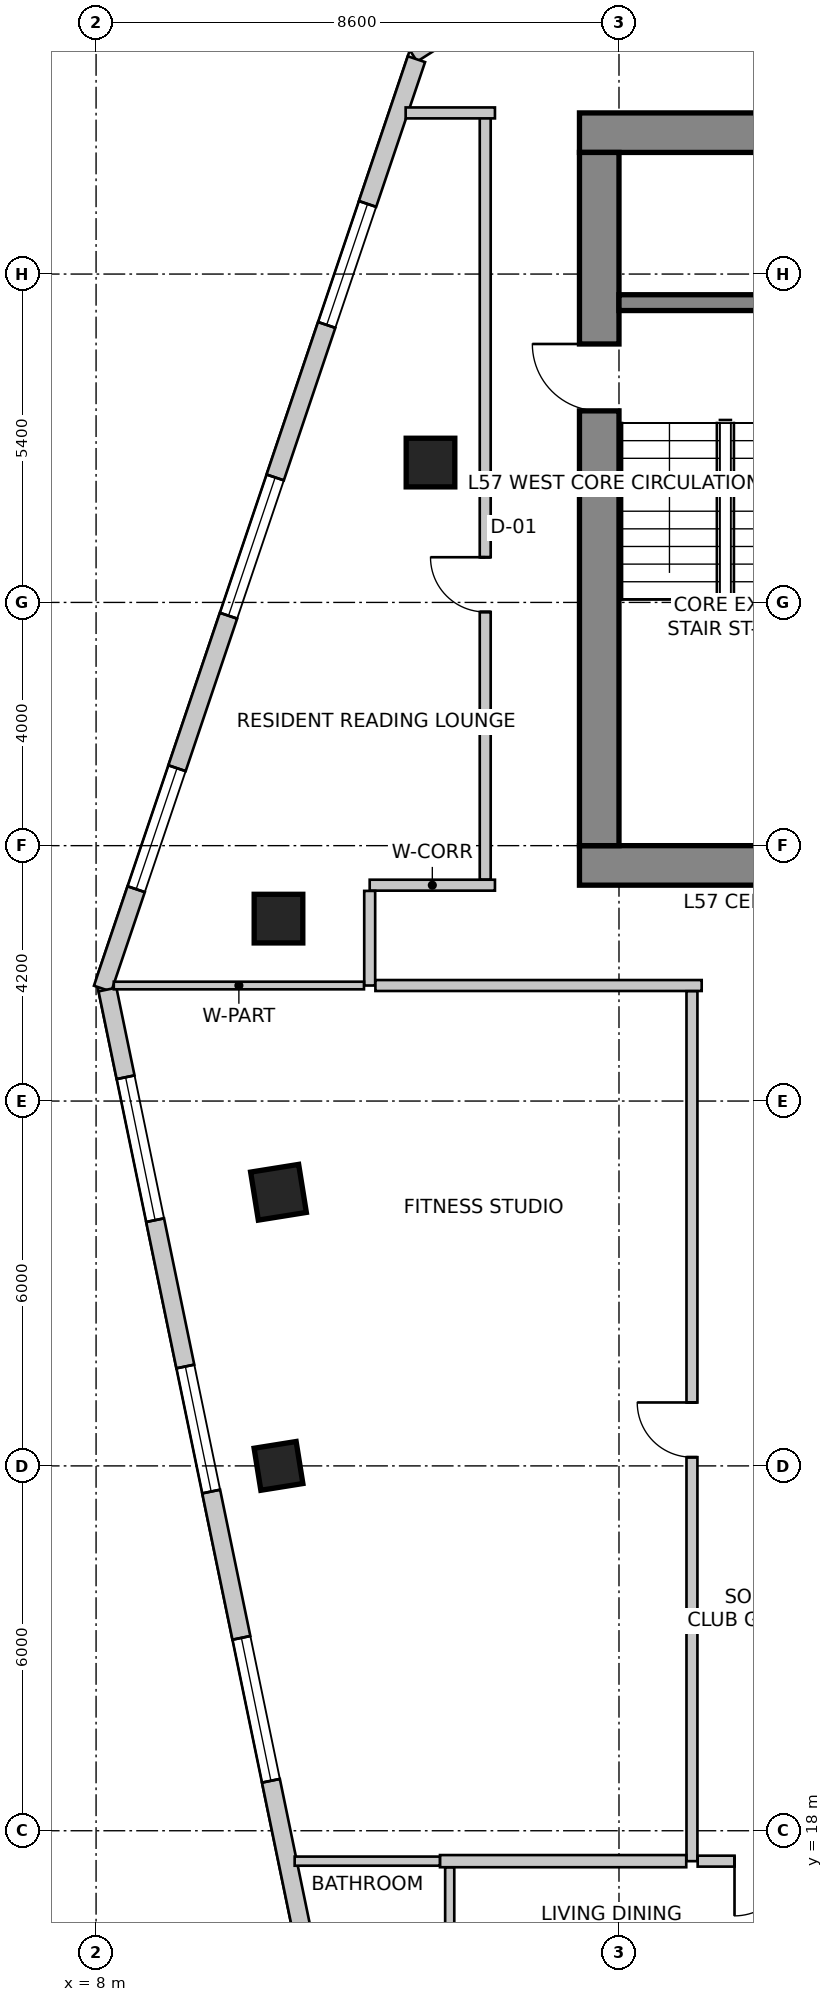
"""IFC4 building model, lengths in metres.
Left out: names, types, materials, properties, quantities, classifications, styles, units other than length and angle.
Written with IfcOpenShell. Run it as: python <this file> out.ifc"""

import sys

from ifc_helpers import new_model, si_unit, direction, frame, frame_2d, origin, origin_2d, place, context, subcontext, project, spatial, rectangle, extrude, source, transform, mapped, element, fill, save


model = new_model("IFC4")
c1 = context("Model", 3, precision=1e-05, world=origin(), true_north=direction((0.0, 1.0)))
c2 = subcontext(c1, "Body", "Model", "MODEL_VIEW")
j1 = project(units=[si_unit("LENGTHUNIT", "METRE"), si_unit("PLANEANGLEUNIT", "RADIAN")], contexts=[c1])
p1 = place(None, origin())
s1 = spatial("IfcSite", under=j1, at=p1, CompositionType="ELEMENT")
p2 = place(p1, origin())
s2 = spatial("IfcBuilding", under=s1, at=p2, CompositionType="ELEMENT")
p3 = place(p2, frame((0.0, 0.0, 225.4)))
s3 = spatial("IfcBuildingStorey", under=s2, at=p3, CompositionType="ELEMENT", Elevation=225.4)
p4 = place(p3, frame((15.95, 45.925, 0.0), z_axis=(0.0, 0.0, 1.0), x_axis=(1.0, 0.0, 0.0)))
e1 = element("IfcWall", 1, at=p4, inside=s3, PredefinedType="SHEAR", context=c2, shape_type="SweptSolid", body=[
    extrude(rectangle(XDim=15.7, YDim=0.65, at=frame_2d((7.85, 0.0))), origin(), (0.0, 0.0, 1.0), 3.5),
])
p5 = place(p3, frame((15.95, 33.875, 0.0), z_axis=(0.0, 0.0, 1.0), x_axis=(1.0, 0.0, 0.0)))
e2 = element("IfcWall", 2, at=p5, inside=s3, PredefinedType="SHEAR", context=c2, shape_type="SweptSolid", body=[
    extrude(rectangle(XDim=15.7, YDim=0.65, at=frame_2d((7.85, 0.0))), origin(), (0.0, 0.0, 1.0), 3.5),
])
m1 = source(origin(), c2, "Body", "SweptSolid", [
    extrude(rectangle(XDim=1.1, YDim=2.15, at=frame_2d((0.55, 1.075))), frame((0.0, 0.335, 0.0), z_axis=(0.0, -1.0, 0.0), x_axis=(1.0, 0.0, 0.0)), (0.0, 0.0, 1.0), 0.67),
])
p6 = place(p5, frame((10.08, 0.0, 0.0)))
e3 = element("IfcOpeningElement", 3, at=p6, cuts=e2, PredefinedType="OPENING", context=c2, shape_type="MappedRepresentation", body=[
    mapped(m1, transform((0.0, 0.0, 0.0), scale=1.0)),
])
p7 = place(p3, frame((16.275, 34.2, 0.0), z_axis=(0.0, 0.0, 1.0), x_axis=(0.0, 1.0, 0.0)))
e4 = element("IfcWall", 4, at=p7, inside=s3, PredefinedType="SHEAR", context=c2, shape_type="SweptSolid", body=[
    extrude(rectangle(XDim=11.4, YDim=0.65, at=frame_2d((5.7, 0.0))), origin(), (0.0, 0.0, 1.0), 3.5),
])
p8 = place(p7, frame((7.15, 0.0, 0.0)))
e5 = element("IfcOpeningElement", 5, at=p8, cuts=e4, PredefinedType="OPENING", context=c2, shape_type="MappedRepresentation", body=[
    mapped(m1, transform((0.0, 0.0, 0.0), scale=1.0)),
])
p9 = place(p3, frame((16.6, 43.13, 0.0), z_axis=(0.0, 0.0, 1.0), x_axis=(1.0, 0.0, 0.0)))
e6 = element("IfcWall", 6, at=p9, inside=s3, PredefinedType="SHEAR", context=c2, shape_type="SweptSolid", body=[
    extrude(rectangle(XDim=3.5, YDim=0.26, at=frame_2d((1.75, 0.0))), origin(), (0.0, 0.0, 1.0), 3.5),
])
m2 = source(origin(), c2, "Body", "SweptSolid", [
    extrude(rectangle(XDim=0.8, YDim=0.8, at=origin_2d()), origin(), (0.0, 0.0, 1.0), 3.5),
])
for number, where, z_axis, x_axis in (
    (7, (11.0, 33.0, 0.0), (0.0, 0.0, 1.0), (1.0, 0.0, 0.0)),
    (8, (13.5, 40.5, 0.0), (0.0, 0.0, 1.0), (1.0, 0.0, 0.0)),
    (9, (11.0, 28.5, 0.0), (0.0, 0.0, 1.0), (0.158, -0.987, 0.0)),
):
    element("IfcColumn", number, at=place(p3, frame(where, z_axis=z_axis, x_axis=x_axis)), inside=s3, PredefinedType="COLUMN", context=c2, shape_type="MappedRepresentation", body=[
        mapped(m2, transform((0.0, 0.0, 0.0), scale=1.0)),
    ])
m3 = source(origin(), c2, "Body", "SweptSolid", [
    extrude(rectangle(XDim=0.7, YDim=0.7, at=origin_2d()), origin(), (0.0, 0.0, 1.0), 3.5),
])
p10 = place(p3, frame((11.0, 24.0, 0.0), z_axis=(0.0, 0.0, 1.0), x_axis=(0.158158067254, -0.987413806751, 0.0)))
e10 = element("IfcColumn", 10, at=p10, inside=s3, PredefinedType="COLUMN", context=c2, shape_type="MappedRepresentation", body=[
    mapped(m3, transform((0.0, 0.0, 0.0), scale=1.0)),
])
p11 = place(p3, frame((21.874, 52.742, 0.0), z_axis=(0.0, 0.0, 1.0), x_axis=(-0.84365659959, -0.536883173482, 0.0)))
e11 = element("IfcWall", 11, at=p11, inside=s3, PredefinedType="SOLIDWALL", context=c2, shape_type="SweptSolid", body=[
    extrude(rectangle(XDim=10.283, YDim=0.3, at=frame_2d((5.142, 0.0))), origin(), (0.0, 0.0, 1.0), 3.25),
])
m4 = source(origin(), c2, "Body", "SweptSolid", [
    extrude(rectangle(XDim=2.4, YDim=2.2, at=frame_2d((1.2, 1.1))), frame((0.0, 0.16, 0.0), z_axis=(0.0, -1.0, 0.0), x_axis=(1.0, 0.0, 0.0)), (0.0, 0.0, 1.0), 0.32),
])
p12 = place(p11, frame((3.307, 0.0, 0.85)))
e12 = element("IfcOpeningElement", 12, at=p12, cuts=e11, PredefinedType="OPENING", context=c2, shape_type="MappedRepresentation", body=[
    mapped(m4, transform((0.0, 0.0, 0.0), scale=1.0)),
])
p13 = place(p3, frame((13.269, 47.134, 0.0), z_axis=(0.0, 0.0, 1.0), x_axis=(-0.319920776449, -0.947444297464, 0.0)))
e13 = element("IfcWall", 13, at=p13, inside=s3, PredefinedType="SOLIDWALL", context=c2, shape_type="SweptSolid", body=[
    extrude(rectangle(XDim=16.133, YDim=0.3, at=frame_2d((8.067, 0.0))), origin(), (0.0, 0.0, 1.0), 3.25),
])
m5 = source(origin(), c2, "Body", "SweptSolid", [
    extrude(rectangle(XDim=2.1, YDim=2.0, at=frame_2d((1.05, 1.0))), frame((0.0, 0.16, 0.0), z_axis=(0.0, -1.0, 0.0), x_axis=(1.0, 0.0, 0.0)), (0.0, 0.0, 1.0), 0.32),
])
p14 = place(p13, frame((2.513, 0.0, 0.85)))
e14 = element("IfcOpeningElement", 14, at=p14, cuts=e13, PredefinedType="OPENING", context=c2, shape_type="MappedRepresentation", body=[
    mapped(m5, transform((0.0, 0.0, 0.0), scale=1.0)),
])
p15 = place(p13, frame((7.26, 0.0, 0.85)))
e15 = element("IfcOpeningElement", 15, at=p15, cuts=e13, PredefinedType="OPENING", context=c2, shape_type="MappedRepresentation", body=[
    mapped(m4, transform((0.0, 0.0, 0.0), scale=1.0)),
])
p16 = place(p13, frame((12.307, 0.0, 0.85)))
e16 = element("IfcOpeningElement", 16, at=p16, cuts=e13, PredefinedType="OPENING", context=c2, shape_type="MappedRepresentation", body=[
    mapped(m5, transform((0.0, 0.0, 0.0), scale=1.0)),
])
p17 = place(p3, frame((8.188, 31.834, 0.0), z_axis=(0.0, 0.0, 1.0), x_axis=(0.202303475707, -0.979322880217, 0.0)))
e17 = element("IfcWall", 17, at=p17, inside=s3, PredefinedType="SOLIDWALL", context=c2, shape_type="SweptSolid", body=[
    extrude(rectangle(XDim=15.766, YDim=0.3, at=frame_2d((7.883, 0.0))), origin(), (0.0, 0.0, 1.0), 3.25),
])
p18 = place(p17, frame((1.473, 0.0, 0.85)))
e18 = element("IfcOpeningElement", 18, at=p18, cuts=e17, PredefinedType="OPENING", context=c2, shape_type="MappedRepresentation", body=[
    mapped(m4, transform((0.0, 0.0, 0.0), scale=1.0)),
])
p19 = place(p17, frame((6.33, 0.0, 0.85)))
e19 = element("IfcOpeningElement", 19, at=p19, cuts=e17, PredefinedType="OPENING", context=c2, shape_type="MappedRepresentation", body=[
    mapped(m5, transform((0.0, 0.0, 0.0), scale=1.0)),
])
p20 = place(p17, frame((10.887, 0.0, 0.85)))
e20 = element("IfcOpeningElement", 20, at=p20, cuts=e17, PredefinedType="OPENING", context=c2, shape_type="MappedRepresentation", body=[
    mapped(m4, transform((0.0, 0.0, 0.0), scale=1.0)),
])
p21 = place(p3, frame((12.5, 33.55, 0.0), z_axis=(0.0, 0.0, 1.0), x_axis=(1.0, 0.0, 0.0)))
e21 = element("IfcWall", 21, at=p21, inside=s3, PredefinedType="PARTITIONING", context=c2, shape_type="SweptSolid", body=[
    extrude(rectangle(XDim=2.06, YDim=0.18, at=frame_2d((1.03, 0.0))), origin(), (0.0, 0.0, 1.0), 3.25),
])
p22 = place(p3, frame((12.5, 31.9, 0.0), z_axis=(0.0, 0.0, 1.0), x_axis=(0.0, 1.0, 0.0)))
e22 = element("IfcWall", 22, at=p22, inside=s3, PredefinedType="PARTITIONING", context=c2, shape_type="SweptSolid", body=[
    extrude(rectangle(XDim=1.556, YDim=0.18, at=frame_2d((0.778, 0.0))), origin(), (0.0, 0.0, 1.0), 2.835),
])
p23 = place(p3, frame((17.96, 31.9, 0.0), z_axis=(0.0, 0.0, 1.0), x_axis=(-1.0, 0.0, 0.0)))
e23 = element("IfcWall", 23, at=p23, inside=s3, PredefinedType="PARTITIONING", context=c2, shape_type="SweptSolid", body=[
    extrude(rectangle(XDim=5.366, YDim=0.18, at=frame_2d((2.683, 0.0))), origin(), (0.0, 0.0, 1.0), 2.835),
])
p24 = place(p3, frame((14.4, 33.644, 0.0), z_axis=(0.0, 0.0, 1.0), x_axis=(0.0, 1.0, 0.0)))
e24 = element("IfcWall", 24, at=p24, inside=s3, PredefinedType="PARTITIONING", context=c2, shape_type="SweptSolid", body=[
    extrude(rectangle(XDim=12.606, YDim=0.18, at=frame_2d((6.303, 0.0))), origin(), (0.0, 0.0, 1.0), 3.25),
])
m6 = source(origin(), c2, "Body", "SweptSolid", [
    extrude(rectangle(XDim=0.9, YDim=2.15, at=frame_2d((0.45, 1.075))), frame((0.0, 0.1, 0.0), z_axis=(0.0, -1.0, 0.0), x_axis=(1.0, 0.0, 0.0)), (0.0, 0.0, 1.0), 0.2),
])
p25 = place(p24, frame((4.399, 0.0, 0.0)))
e25 = element("IfcOpeningElement", 25, at=p25, cuts=e24, PredefinedType="OPENING", context=c2, shape_type="MappedRepresentation", body=[
    mapped(m6, transform((0.0, 0.0, 0.0), scale=1.0)),
])
p26 = place(p3, frame((14.56, 46.25, 0.0), z_axis=(0.0, 0.0, 1.0), x_axis=(-1.0, 0.0, 0.0)))
e26 = element("IfcWall", 26, at=p26, inside=s3, PredefinedType="PARTITIONING", context=c2, shape_type="SweptSolid", body=[
    extrude(rectangle(XDim=1.469, YDim=0.18, at=frame_2d((0.734, 0.0))), origin(), (0.0, 0.0, 1.0), 3.25),
])
p27 = place(p3, frame((12.406, 31.9, 0.0), z_axis=(0.0, 0.0, 1.0), x_axis=(-1.0, 0.0, 0.0)))
e27 = element("IfcWall", 27, at=p27, inside=s3, PredefinedType="PARTITIONING", context=c2, shape_type="SweptSolid", body=[
    extrude(rectangle(XDim=4.115, YDim=0.125, at=frame_2d((2.057, 0.0))), origin(), (0.0, 0.0, 1.0), 2.542),
])
p28 = place(p3, frame((17.8, 17.5, 0.0), z_axis=(0.0, 0.0, 1.0), x_axis=(0.0, 1.0, 0.0)))
e28 = element("IfcWall", 28, at=p28, inside=s3, PredefinedType="PARTITIONING", context=c2, shape_type="SweptSolid", body=[
    extrude(rectangle(XDim=14.306, YDim=0.18, at=frame_2d((7.153, 0.0))), origin(), (0.0, 0.0, 1.0), 2.688),
])
p29 = place(p28, frame((6.643, 0.0, 0.0)))
e29 = element("IfcOpeningElement", 29, at=p29, cuts=e28, PredefinedType="OPENING", context=c2, shape_type="MappedRepresentation", body=[
    mapped(m6, transform((0.0, 0.0, 0.0), scale=1.0)),
])
p30 = place(p3, frame((20.006, 17.5, 0.0), z_axis=(0.0, 0.0, 1.0), x_axis=(-1.0, 0.0, 0.0)))
e30 = element("IfcWall", 30, at=p30, inside=s3, PredefinedType="PARTITIONING", context=c2, shape_type="SweptSolid", body=[
    extrude(rectangle(XDim=2.112, YDim=0.18, at=frame_2d((1.056, 0.0))), origin(), (0.0, 0.0, 1.0), 3.25),
])
p31 = place(p30, frame((0.606, 0.0, 0.0)))
e31 = element("IfcOpeningElement", 31, at=p31, cuts=e30, PredefinedType="OPENING", context=c2, shape_type="MappedRepresentation", body=[
    mapped(m6, transform((0.0, 0.0, 0.0), scale=1.0)),
])
p32 = place(p3, frame((17.706, 17.5, 0.0), z_axis=(0.0, 0.0, 1.0), x_axis=(-1.0, 0.0, 0.0)))
e32 = element("IfcWall", 32, at=p32, inside=s3, PredefinedType="PARTITIONING", context=c2, shape_type="SweptSolid", body=[
    extrude(rectangle(XDim=4.05, YDim=0.2, at=frame_2d((2.025, 0.0))), origin(), (0.0, 0.0, 1.0), 3.25),
])
p33 = place(p3, frame((13.654, 17.5, 0.0), z_axis=(0.0, 0.0, 1.0), x_axis=(-1.0, 0.0, 0.0)))
e33 = element("IfcWall", 33, at=p33, inside=s3, PredefinedType="PARTITIONING", context=c2, shape_type="SweptSolid", body=[
    extrude(rectangle(XDim=2.388, YDim=0.15, at=frame_2d((1.194, 0.0))), origin(), (0.0, 0.0, 1.0), 3.25),
])
p34 = place(p3, frame((13.816, 12.865, 0.0), z_axis=(0.0, 0.0, 1.0), x_axis=(0.0, 1.0, 0.0)))
e34 = element("IfcWall", 34, at=p34, inside=s3, PredefinedType="PARTITIONING", context=c2, shape_type="SweptSolid", body=[
    extrude(rectangle(XDim=4.531, YDim=0.15, at=frame_2d((2.266, 0.0))), origin(), (0.0, 0.0, 1.0), 3.25),
])
m7 = source(origin(), c2, "Body", "SweptSolid", [
    extrude(rectangle(XDim=0.85, YDim=2.15, at=frame_2d((0.425, 1.075))), frame((0.0, 0.085, 0.0), z_axis=(0.0, -1.0, 0.0), x_axis=(1.0, 0.0, 0.0)), (0.0, 0.0, 1.0), 0.17),
])
p35 = place(p34, frame((1.841, 0.0, 0.0)))
e35 = element("IfcOpeningElement", 35, at=p35, cuts=e34, PredefinedType="OPENING", context=c2, shape_type="MappedRepresentation", body=[
    mapped(m7, transform((0.0, 0.0, 0.0), scale=1.0)),
])
m8 = source(origin(), c2, "Body", "SweptSolid", [
    extrude(rectangle(XDim=2.1, YDim=2.0, at=frame_2d((1.05, 1.0))), frame((0.0, -0.015, 0.0), z_axis=(0.0, -1.0, 0.0), x_axis=(1.0, 0.0, 0.0)), (0.0, 0.0, 1.0), 0.06),
])
p36 = place(p14, origin())
e36 = element("IfcWindow", 36, at=p36, inside=s3, PartitioningType="SINGLE_PANEL", PredefinedType="WINDOW", context=c2, shape_type="MappedRepresentation", body=[
    mapped(m8, transform((0.0, 0.0, 0.0), scale=1.0)),
])
fill(e14, e36)
m9 = source(origin(), c2, "Body", "SweptSolid", [
    extrude(rectangle(XDim=2.4, YDim=2.2, at=frame_2d((1.2, 1.1))), frame((0.0, -0.015, 0.0), z_axis=(0.0, -1.0, 0.0), x_axis=(1.0, 0.0, 0.0)), (0.0, 0.0, 1.0), 0.06),
])
p37 = place(p15, origin())
e37 = element("IfcWindow", 37, at=p37, inside=s3, PartitioningType="SINGLE_PANEL", PredefinedType="WINDOW", context=c2, shape_type="MappedRepresentation", body=[
    mapped(m9, transform((0.0, 0.0, 0.0), scale=1.0)),
])
fill(e15, e37)
p38 = place(p16, origin())
e38 = element("IfcWindow", 38, at=p38, inside=s3, PartitioningType="SINGLE_PANEL", PredefinedType="WINDOW", context=c2, shape_type="MappedRepresentation", body=[
    mapped(m8, transform((0.0, 0.0, 0.0), scale=1.0)),
])
fill(e16, e38)
p39 = place(p18, origin())
e39 = element("IfcWindow", 39, at=p39, inside=s3, PartitioningType="SINGLE_PANEL", PredefinedType="WINDOW", context=c2, shape_type="MappedRepresentation", body=[
    mapped(m9, transform((0.0, 0.0, 0.0), scale=1.0)),
])
fill(e18, e39)
p40 = place(p19, origin())
e40 = element("IfcWindow", 40, at=p40, inside=s3, PartitioningType="SINGLE_PANEL", PredefinedType="WINDOW", context=c2, shape_type="MappedRepresentation", body=[
    mapped(m8, transform((0.0, 0.0, 0.0), scale=1.0)),
])
fill(e19, e40)
p41 = place(p20, origin())
e41 = element("IfcWindow", 41, at=p41, inside=s3, PartitioningType="SINGLE_PANEL", PredefinedType="WINDOW", context=c2, shape_type="MappedRepresentation", body=[
    mapped(m9, transform((0.0, 0.0, 0.0), scale=1.0)),
])
fill(e20, e41)
m10 = source(origin(), c2, "Body", "SweptSolid", [
    extrude(rectangle(XDim=1.1, YDim=2.15, at=frame_2d((0.55, 1.075))), frame((0.0, 0.025, 0.0), z_axis=(0.0, -1.0, 0.0), x_axis=(1.0, 0.0, 0.0)), (0.0, 0.0, 1.0), 0.05),
])
p42 = place(p8, origin())
e42 = element("IfcDoor", 42, at=p42, inside=s3, OperationType="SINGLE_SWING_RIGHT", PredefinedType="DOOR", context=c2, shape_type="MappedRepresentation", body=[
    mapped(m10, transform((0.0, 0.0, 0.0), scale=1.0)),
])
fill(e5, e42)
m11 = source(origin(), c2, "Body", "SweptSolid", [
    extrude(rectangle(XDim=0.9, YDim=2.15, at=frame_2d((0.45, 1.075))), frame((0.0, 0.025, 0.0), z_axis=(0.0, -1.0, 0.0), x_axis=(1.0, 0.0, 0.0)), (0.0, 0.0, 1.0), 0.05),
])
p43 = place(p25, origin())
e43 = element("IfcDoor", 43, at=p43, inside=s3, OperationType="SINGLE_SWING_RIGHT", PredefinedType="DOOR", context=c2, shape_type="MappedRepresentation", body=[
    mapped(m11, transform((0.0, 0.0, 0.0), scale=1.0)),
])
fill(e25, e43)
p44 = place(p29, origin())
e44 = element("IfcDoor", 44, at=p44, inside=s3, OperationType="SINGLE_SWING_RIGHT", PredefinedType="DOOR", context=c2, shape_type="MappedRepresentation", body=[
    mapped(m11, transform((0.0, 0.0, 0.0), scale=1.0)),
])
fill(e29, e44)
m12 = source(origin(), c2, "Body", "SweptSolid", [
    extrude(rectangle(XDim=0.9, YDim=2.15, at=frame_2d((0.45, 1.075))), frame((0.0, 0.025, 0.0), z_axis=(0.0, -1.0, 0.0), x_axis=(1.0, 0.0, 0.0)), (0.0, 0.0, 1.0), 0.05),
])
p45 = place(p31, origin())
e45 = element("IfcDoor", 45, at=p45, inside=s3, OperationType="SINGLE_SWING_RIGHT", PredefinedType="DOOR", context=c2, shape_type="MappedRepresentation", body=[
    mapped(m12, transform((0.0, 0.0, 0.0), scale=1.0)),
])
fill(e31, e45)
save(model, sys.argv[1])
